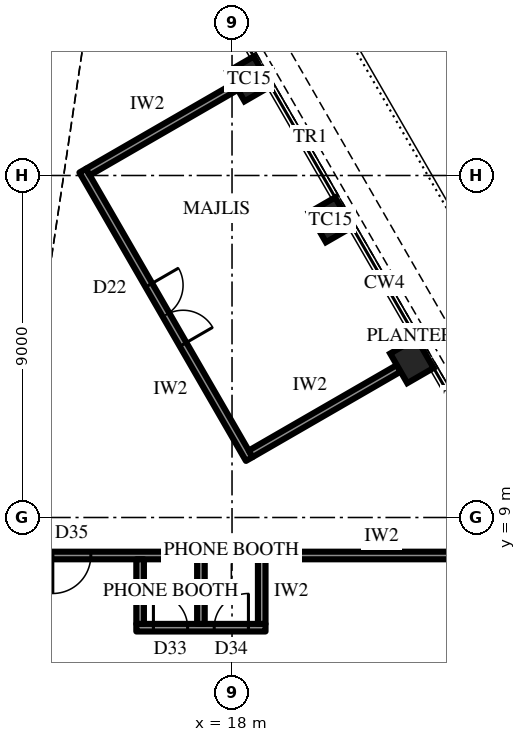
"""IFC4 building model, lengths in metres.
Left out: names, types, materials, properties, quantities, classifications, styles, units other than length and angle.
Written with IfcOpenShell. Run it as: python <this file> out.ifc"""

import sys

from ifc_helpers import new_model, si_unit, direction, frame, frame_2d, origin, origin_2d, place, context, subcontext, project, spatial, rectangle, extrude, element, fill, save


model = new_model("IFC4")
c1 = context("Model", 3, precision=1e-05, world=origin(), true_north=direction((0.0, 1.0)))
c2 = subcontext(c1, "Body", "Model", "MODEL_VIEW")
j1 = project(units=[si_unit("LENGTHUNIT", "METRE"), si_unit("PLANEANGLEUNIT", "RADIAN")], contexts=[c1])
p1 = place(None, origin())
s1 = spatial("IfcSite", under=j1, at=p1, CompositionType="ELEMENT")
p2 = place(p1, origin())
s2 = spatial("IfcBuilding", under=s1, at=p2, CompositionType="ELEMENT")
p3 = place(p2, frame((0.0, 0.0, 357.7)))
s3 = spatial("IfcBuildingStorey", under=s2, at=p3, CompositionType="ELEMENT", Elevation=357.7)
for number, where, z_axis, x_axis in (
    (1, (22.733, 13.125, 0.0), (0.0, 0.0, 1.0), (-0.5, 0.866, 0.0)),
    (2, (20.592, 16.833, 0.0), (0.0, 0.0, 1.0), (-0.5, 0.866, 0.0)),
    (3, (18.451, 20.542, 0.0), (0.0, 0.0, 1.0), (-0.5, 0.866, 0.0)),
):
    element("IfcColumn", number, at=place(p3, frame(where, z_axis=z_axis, x_axis=x_axis)), inside=s3, PredefinedType="COLUMN", context=c2, shape_type="SweptSolid", body=[
        extrude(rectangle(XDim=0.9, YDim=0.8, at=origin_2d()), origin(), (0.0, 0.0, 1.0), 4.2),
    ])
p4 = place(p3, frame((18.453, 10.538, 0.0), z_axis=(0.0, 0.0, 1.0), x_axis=(-0.500006995557, 0.86602136486, 0.0)))
e4 = element("IfcWall", 4, at=p4, inside=s3, PredefinedType="PARTITIONING", context=c2, shape_type="SweptSolid", body=[
    extrude(rectangle(XDim=8.764, YDim=0.2, at=frame_2d((4.382, 0.0))), origin(), (0.0, 0.0, 1.0), 4.0),
])
p5 = place(p4, frame((3.482, 0.0, 0.0)))
e5 = element("IfcOpeningElement", 5, at=p5, cuts=e4, PredefinedType="OPENING", context=c2, shape_type="SweptSolid", body=[
    extrude(rectangle(XDim=1.8, YDim=2.4, at=frame_2d((0.9, 1.2))), frame((0.0, 0.11, 0.0), z_axis=(0.0, -1.0, 0.0), x_axis=(1.0, 0.0, 0.0)), (0.0, 0.0, 1.0), 0.22),
])
p6 = place(p3, frame((18.49, 10.675, 0.0), z_axis=(0.0, 0.0, 1.0), x_axis=(0.866017533419, 0.500013631625, 0.0)))
e6 = element("IfcWall", 6, at=p6, inside=s3, PredefinedType="PARTITIONING", context=c2, shape_type="SweptSolid", body=[
    extrude(rectangle(XDim=4.5, YDim=0.2, at=frame_2d((2.25, 0.0))), origin(), (0.0, 0.0, 1.0), 3.082),
])
p7 = place(p3, frame((14.208, 18.092, 0.0), z_axis=(0.0, 0.0, 1.0), x_axis=(0.866031096941, 0.499990139034, 0.0)))
e7 = element("IfcWall", 7, at=p7, inside=s3, PredefinedType="PARTITIONING", context=c2, shape_type="SweptSolid", body=[
    extrude(rectangle(XDim=4.5, YDim=0.2, at=frame_2d((2.25, 0.0))), origin(), (0.0, 0.0, 1.0), 3.082),
])
p8 = place(p3, frame((12.425, 8.0, 0.0), z_axis=(0.0, 0.0, 1.0), x_axis=(1.0, 0.0, 0.0)))
e8 = element("IfcWall", 8, at=p8, inside=s3, PredefinedType="PARTITIONING", context=c2, shape_type="SweptSolid", body=[
    extrude(rectangle(XDim=13.59, YDim=0.2, at=frame_2d((6.795, 0.0))), origin(), (0.0, 0.0, 1.0), 4.0),
])
p9 = place(p8, frame((0.859, 0.0, 0.0)))
e9 = element("IfcOpeningElement", 9, at=p9, cuts=e8, PredefinedType="OPENING", context=c2, shape_type="SweptSolid", body=[
    extrude(rectangle(XDim=1.0, YDim=2.2, at=frame_2d((0.5, 1.1))), frame((0.0, 0.11, 0.0), z_axis=(0.0, -1.0, 0.0), x_axis=(1.0, 0.0, 0.0)), (0.0, 0.0, 1.0), 0.22),
])
p10 = place(p3, frame((15.482, 6.1, 0.0), z_axis=(0.0, 0.0, 1.0), x_axis=(1.0, 0.0, 0.0)))
e10 = element("IfcWall", 10, at=p10, inside=s3, PredefinedType="PARTITIONING", context=c2, shape_type="SweptSolid", body=[
    extrude(rectangle(XDim=3.4, YDim=0.2, at=frame_2d((1.7, 0.0))), origin(), (0.0, 0.0, 1.0), 4.0),
])
p11 = place(p10, frame((0.45, 0.0, 0.0)))
e11 = element("IfcOpeningElement", 11, at=p11, cuts=e10, PredefinedType="OPENING", context=c2, shape_type="SweptSolid", body=[
    extrude(rectangle(XDim=0.9, YDim=2.2, at=frame_2d((0.45, 1.1))), frame((0.0, 0.11, 0.0), z_axis=(0.0, -1.0, 0.0), x_axis=(1.0, 0.0, 0.0)), (0.0, 0.0, 1.0), 0.22),
])
p12 = place(p10, frame((2.05, 0.0, 0.0)))
e12 = element("IfcOpeningElement", 12, at=p12, cuts=e10, PredefinedType="OPENING", context=c2, shape_type="SweptSolid", body=[
    extrude(rectangle(XDim=0.9, YDim=2.2, at=frame_2d((0.45, 1.1))), frame((0.0, 0.11, 0.0), z_axis=(0.0, -1.0, 0.0), x_axis=(1.0, 0.0, 0.0)), (0.0, 0.0, 1.0), 0.22),
])
for number, where, z_axis, x_axis in (
    (13, (15.582, 7.9, 0.0), (0.0, 0.0, 1.0), (0.0, -1.0, 0.0)),
    (14, (17.182, 7.9, 0.0), (0.0, 0.0, 1.0), (0.0, -1.0, 0.0)),
    (15, (18.781, 7.9, 0.0), (0.0, 0.0, 1.0), (0.0, -1.0, 0.0)),
):
    element("IfcWall", number, at=place(p3, frame(where, z_axis=z_axis, x_axis=x_axis)), inside=s3, PredefinedType="PARTITIONING", context=c2, shape_type="SweptSolid", body=[
        extrude(rectangle(XDim=1.7, YDim=0.2, at=frame_2d((0.85, 0.0))), origin(), (0.0, 0.0, 1.0), 4.0),
    ])
p13 = place(p5, frame((1.8, 0.0, 0.0), z_axis=(0.0, 0.0, 1.0), x_axis=(-1.0, 0.0, 0.0)))
e16 = element("IfcDoor", 16, at=p13, inside=s3, OperationType="DOUBLE_DOOR_SINGLE_SWING", PredefinedType="DOOR", context=c2, shape_type="SweptSolid", body=[
    extrude(rectangle(XDim=1.8, YDim=2.4, at=frame_2d((0.9, 1.2))), frame((0.0, 0.025, 0.0), z_axis=(0.0, -1.0, 0.0), x_axis=(1.0, 0.0, 0.0)), (0.0, 0.0, 1.0), 0.05),
])
fill(e5, e16)
p14 = place(p9, frame((1.0, 0.0, 0.0), z_axis=(0.0, 0.0, 1.0), x_axis=(-1.0, 0.0, 0.0)))
e17 = element("IfcDoor", 17, at=p14, inside=s3, OperationType="SINGLE_SWING_LEFT", PredefinedType="DOOR", context=c2, shape_type="SweptSolid", body=[
    extrude(rectangle(XDim=1.0, YDim=2.2, at=frame_2d((0.5, 1.1))), frame((0.0, 0.025, 0.0), z_axis=(0.0, -1.0, 0.0), x_axis=(1.0, 0.0, 0.0)), (0.0, 0.0, 1.0), 0.05),
])
fill(e9, e17)
p15 = place(p11, origin())
e18 = element("IfcDoor", 18, at=p15, inside=s3, OperationType="SINGLE_SWING_RIGHT", PredefinedType="DOOR", context=c2, shape_type="SweptSolid", body=[
    extrude(rectangle(XDim=0.9, YDim=2.2, at=frame_2d((0.45, 1.1))), frame((0.0, 0.025, 0.0), z_axis=(0.0, -1.0, 0.0), x_axis=(1.0, 0.0, 0.0)), (0.0, 0.0, 1.0), 0.05),
])
fill(e11, e18)
p16 = place(p12, origin())
e19 = element("IfcDoor", 19, at=p16, inside=s3, OperationType="SINGLE_SWING_LEFT", PredefinedType="DOOR", context=c2, shape_type="SweptSolid", body=[
    extrude(rectangle(XDim=0.9, YDim=2.2, at=frame_2d((0.45, 1.1))), frame((0.0, 0.025, 0.0), z_axis=(0.0, -1.0, 0.0), x_axis=(1.0, 0.0, 0.0)), (0.0, 0.0, 1.0), 0.05),
])
fill(e12, e19)
save(model, sys.argv[1])
